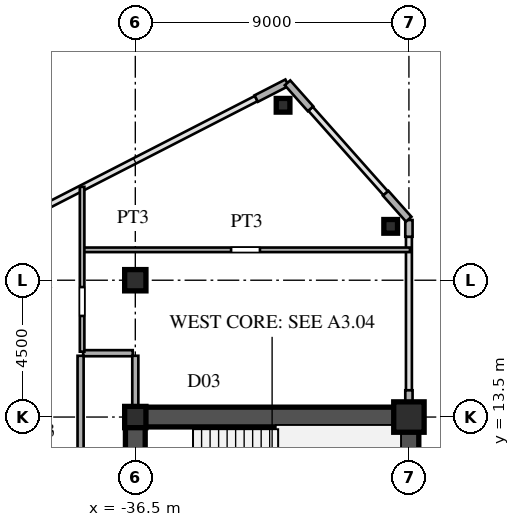
"""IFC4 building model, lengths in metres.
Left out: names, types, materials, properties, quantities, classifications, styles, units other than length and angle.
Written with IfcOpenShell. Run it as: python <this file> out.ifc"""

import sys

from ifc_helpers import new_model, si_unit, direction, frame, frame_2d, origin, origin_2d, place, context, subcontext, project, spatial, rectangle, hollow_rectangle, i_section, extrude, source, transform, mapped, element, save


model = new_model("IFC4")
c1 = context("Model", 3, precision=1e-05, world=origin(), true_north=direction((0.0, 1.0)))
c2 = subcontext(c1, "Body", "Model", "MODEL_VIEW")
j1 = project(units=[si_unit("LENGTHUNIT", "METRE"), si_unit("PLANEANGLEUNIT", "RADIAN")], contexts=[c1])
p1 = place(None, origin())
s1 = spatial("IfcSite", under=j1, at=p1, CompositionType="ELEMENT")
p2 = place(p1, origin())
s2 = spatial("IfcBuilding", under=s1, at=p2, CompositionType="ELEMENT")
p3 = place(p2, frame((0.0, 0.0, 110.4)))
s3 = spatial("IfcBuildingStorey", under=s2, at=p3, CompositionType="ELEMENT", Elevation=110.4)
m1 = source(origin(), c2, "Body", "SweptSolid", [
    extrude(hollow_rectangle(XDim=1.0, YDim=1.0, WallThickness=0.042, at=origin_2d()), origin(), (0.0, 0.0, 1.0), 3.6),
])
p4 = place(p3, frame((-27.5, 13.5, 0.0), z_axis=(0.0, 0.0, 1.0), x_axis=(1.0, 0.0, 0.0)))
e1 = element("IfcColumn", 1, at=p4, inside=s3, PredefinedType="COLUMN", context=c2, shape_type="MappedRepresentation", body=[
    mapped(m1, transform((0.0, 0.0, 0.0), scale=1.0)),
])
m2 = source(origin(), c2, "Body", "SweptSolid", [
    extrude(i_section(OverallWidth=0.7, OverallDepth=0.7, WebThickness=0.028, FlangeThickness=0.045, at=origin_2d()), origin(), (0.0, 0.0, 1.0), 3.6),
])
for number, where, z_axis, x_axis in (
    (2, (-36.5, 13.5, 0.0), (0.0, 0.0, 1.0), (1.0, 0.0, 0.0)),
    (3, (-36.5, 18.0, 0.0), (0.0, 0.0, 1.0), (1.0, 0.0, 0.0)),
):
    element("IfcColumn", number, at=place(p3, frame(where, z_axis=z_axis, x_axis=x_axis)), inside=s3, PredefinedType="COLUMN", context=c2, shape_type="MappedRepresentation", body=[
        mapped(m2, transform((0.0, 0.0, 0.0), scale=1.0)),
    ])
m3 = source(origin(), c2, "Body", "SweptSolid", [
    extrude(hollow_rectangle(XDim=0.45, YDim=0.45, WallThickness=0.018, at=origin_2d()), origin(), (0.0, 0.0, 1.0), 3.6),
])
for number, where, z_axis, x_axis in (
    (4, (-28.1, 19.772, 0.0), (0.0, 0.0, 1.0), (1.0, 0.0, 0.0)),
    (5, (-31.64, 23.754, 0.0), (0.0, 0.0, 1.0), (1.0, 0.0, 0.0)),
):
    element("IfcColumn", number, at=place(p3, frame(where, z_axis=z_axis, x_axis=x_axis)), inside=s3, PredefinedType="COLUMN", context=c2, shape_type="MappedRepresentation", body=[
        mapped(m3, transform((0.0, 0.0, 0.0), scale=1.0)),
    ])
p5 = place(p3, frame((-27.5, 13.83, 0.0), z_axis=(0.0, 0.0, 1.0), x_axis=(0.0, 1.0, 0.0)))
e6 = element("IfcWall", 6, at=p5, inside=s3, PredefinedType="SOLIDWALL", context=c2, shape_type="SweptSolid", body=[
    extrude(rectangle(XDim=0.55, YDim=0.24, at=frame_2d((0.275, 0.0))), origin(), (0.0, 0.0, 1.0), 2.88),
])
p6 = place(p3, frame((-27.5, 19.43, 0.0), z_axis=(0.0, 0.0, 1.0), x_axis=(0.0, 1.0, 0.0)))
e7 = element("IfcWall", 7, at=p6, inside=s3, PredefinedType="SOLIDWALL", context=c2, shape_type="SweptSolid", body=[
    extrude(rectangle(XDim=0.55, YDim=0.24, at=frame_2d((0.275, 0.0))), origin(), (0.0, 0.0, 1.0), 3.38),
])
for number, where, z_axis, x_axis in (
    (8, (-27.507, 20.008, 0.0), (0.0, 0.0, 1.0), (-0.664, 0.747, 0.0)),
    (9, (-30.736, 23.64, 0.0), (0.0, 0.0, 1.0), (-0.664, 0.747, 0.0)),
):
    element("IfcWall", number, at=place(p3, frame(where, z_axis=z_axis, x_axis=x_axis)), inside=s3, PredefinedType="SOLIDWALL", context=c2, shape_type="SweptSolid", body=[
        extrude(rectangle(XDim=1.14, YDim=0.24, at=frame_2d((0.57, 0.0))), origin(), (0.0, 0.0, 1.0), 3.38),
    ])
p7 = place(p3, frame((-31.509, 24.495, 0.0), z_axis=(0.0, 0.0, 1.0), x_axis=(-0.889797395748, -0.456355776255, 0.0)))
e10 = element("IfcWall", 10, at=p7, inside=s3, PredefinedType="SOLIDWALL", context=c2, shape_type="SweptSolid", body=[
    extrude(rectangle(XDim=1.14, YDim=0.24, at=frame_2d((0.57, 0.0))), origin(), (0.0, 0.0, 1.0), 3.38),
])
p8 = place(p3, frame((-27.5, 1.3, 0.0), z_axis=(0.0, 0.0, 1.0), x_axis=(0.0, 1.0, 0.0)))
e11 = element("IfcWall", 11, at=p8, inside=s3, PredefinedType="SHEAR", context=c2, shape_type="SweptSolid", body=[
    extrude(rectangle(XDim=12.2, YDim=0.65, at=frame_2d((6.1, 0.0))), origin(), (0.0, 0.0, 1.0), 3.38),
])
p9 = place(p3, frame((-36.5, 13.5, 0.0), z_axis=(0.0, 0.0, 1.0), x_axis=(1.0, 0.0, 0.0)))
e12 = element("IfcWall", 12, at=p9, inside=s3, PredefinedType="SHEAR", context=c2, shape_type="SweptSolid", body=[
    extrude(rectangle(XDim=9.0, YDim=0.65, at=frame_2d((4.5, 0.0))), origin(), (0.0, 0.0, 1.0), 3.38),
])
p10 = place(p3, frame((-36.5, 8.2, 0.0), z_axis=(0.0, 0.0, 1.0), x_axis=(0.0, 1.0, 0.0)))
e13 = element("IfcWall", 13, at=p10, inside=s3, PredefinedType="SHEAR", context=c2, shape_type="SweptSolid", body=[
    extrude(rectangle(XDim=5.45, YDim=0.65, at=frame_2d((2.725, 0.0))), origin(), (0.0, 0.0, 1.0), 3.38),
])
p11 = place(p10, frame((0.245, 0.0, 0.0)))
e14 = element("IfcOpeningElement", 14, at=p11, cuts=e13, PredefinedType="OPENING", context=c2, shape_type="SweptSolid", body=[
    extrude(rectangle(XDim=0.95, YDim=2.15, at=frame_2d((0.475, 1.075))), frame((0.0, 0.335, 0.0), z_axis=(0.0, -1.0, 0.0), x_axis=(1.0, 0.0, 0.0)), (0.0, 0.0, 1.0), 0.67),
])
p12 = place(p3, frame((-38.215, 15.6, 0.0), z_axis=(0.0, 0.0, 1.0), x_axis=(1.0, 0.0, 0.0)))
e15 = element("IfcWall", 15, at=p12, inside=s3, PredefinedType="PARTITIONING", context=c2, shape_type="SweptSolid", body=[
    extrude(rectangle(XDim=1.63, YDim=0.2, at=frame_2d((0.815, 0.0))), origin(), (0.0, 0.0, 1.0), 3.38),
])
p13 = place(p3, frame((-38.2, 19.0, 0.0), z_axis=(0.0, 0.0, 1.0), x_axis=(1.0, 0.0, 0.0)))
e16 = element("IfcWall", 16, at=p13, inside=s3, PredefinedType="PARTITIONING", context=c2, shape_type="SweptSolid", body=[
    extrude(rectangle(XDim=10.735, YDim=0.15, at=frame_2d((5.367, 0.0))), origin(), (0.0, 0.0, 1.0), 3.38),
])
p14 = place(p13, frame((4.85, 0.0, 0.0)))
e17 = element("IfcOpeningElement", 17, at=p14, cuts=e16, PredefinedType="OPENING", context=c2, shape_type="SweptSolid", body=[
    extrude(rectangle(XDim=0.95, YDim=2.15, at=frame_2d((0.475, 1.075))), frame((0.0, 0.085, 0.0), z_axis=(0.0, -1.0, 0.0), x_axis=(1.0, 0.0, 0.0)), (0.0, 0.0, 1.0), 0.17),
])
p15 = place(p3, frame((-38.3, -15.515, 0.0), z_axis=(0.0, 0.0, 1.0), x_axis=(0.0, 1.0, 0.0)))
e18 = element("IfcWall", 18, at=p15, inside=s3, PredefinedType="PARTITIONING", context=c2, shape_type="SweptSolid", body=[
    extrude(rectangle(XDim=31.03, YDim=0.2, at=frame_2d((15.515, 0.0))), origin(), (0.0, 0.0, 1.0), 3.38),
])
p16 = place(p15, frame((2.345, 0.0, 0.0)))
e19 = element("IfcOpeningElement", 19, at=p16, cuts=e18, PredefinedType="OPENING", context=c2, shape_type="SweptSolid", body=[
    extrude(rectangle(XDim=1.05, YDim=2.25, at=frame_2d((0.525, 1.125))), frame((0.0, 0.11, 0.0), z_axis=(0.0, -1.0, 0.0), x_axis=(1.0, 0.0, 0.0)), (0.0, 0.0, 1.0), 0.22),
])
p17 = place(p15, frame((13.28, 0.0, 0.0)))
e20 = element("IfcOpeningElement", 20, at=p17, cuts=e18, PredefinedType="OPENING", context=c2, shape_type="SweptSolid", body=[
    extrude(rectangle(XDim=1.05, YDim=2.25, at=frame_2d((0.525, 1.125))), frame((0.0, 0.11, 0.0), z_axis=(0.0, -1.0, 0.0), x_axis=(1.0, 0.0, 0.0)), (0.0, 0.0, 1.0), 0.22),
])
p18 = place(p15, frame((25.567, 0.0, 0.0)))
e21 = element("IfcOpeningElement", 21, at=p18, cuts=e18, PredefinedType="OPENING", context=c2, shape_type="SweptSolid", body=[
    extrude(rectangle(XDim=1.05, YDim=2.25, at=frame_2d((0.525, 1.125))), frame((0.0, 0.11, 0.0), z_axis=(0.0, -1.0, 0.0), x_axis=(1.0, 0.0, 0.0)), (0.0, 0.0, 1.0), 0.22),
])
p19 = place(p3, frame((-38.25, 15.65, 0.0), z_axis=(0.0, 0.0, 1.0), x_axis=(0.0, 1.0, 0.0)))
e22 = element("IfcWall", 22, at=p19, inside=s3, PredefinedType="PARTITIONING", context=c2, shape_type="SweptSolid", body=[
    extrude(rectangle(XDim=5.421, YDim=0.15, at=frame_2d((2.71, 0.0))), origin(), (0.0, 0.0, 1.0), 3.38),
])
p20 = place(p19, frame((1.175, 0.0, 0.0)))
e23 = element("IfcOpeningElement", 23, at=p20, cuts=e22, PredefinedType="OPENING", context=c2, shape_type="SweptSolid", body=[
    extrude(rectangle(XDim=0.95, YDim=2.15, at=frame_2d((0.475, 1.075))), frame((0.0, 0.085, 0.0), z_axis=(0.0, -1.0, 0.0), x_axis=(1.0, 0.0, 0.0)), (0.0, 0.0, 1.0), 0.17),
])
p21 = place(p3, frame((-36.5, 13.83, 0.0), z_axis=(0.0, 0.0, 1.0), x_axis=(0.0, 1.0, 0.0)))
e24 = element("IfcWall", 24, at=p21, inside=s3, PredefinedType="PARTITIONING", context=c2, shape_type="SweptSolid", body=[
    extrude(rectangle(XDim=1.685, YDim=0.2, at=frame_2d((0.842, 0.0))), origin(), (0.0, 0.0, 1.0), 2.78),
])
save(model, sys.argv[1])
